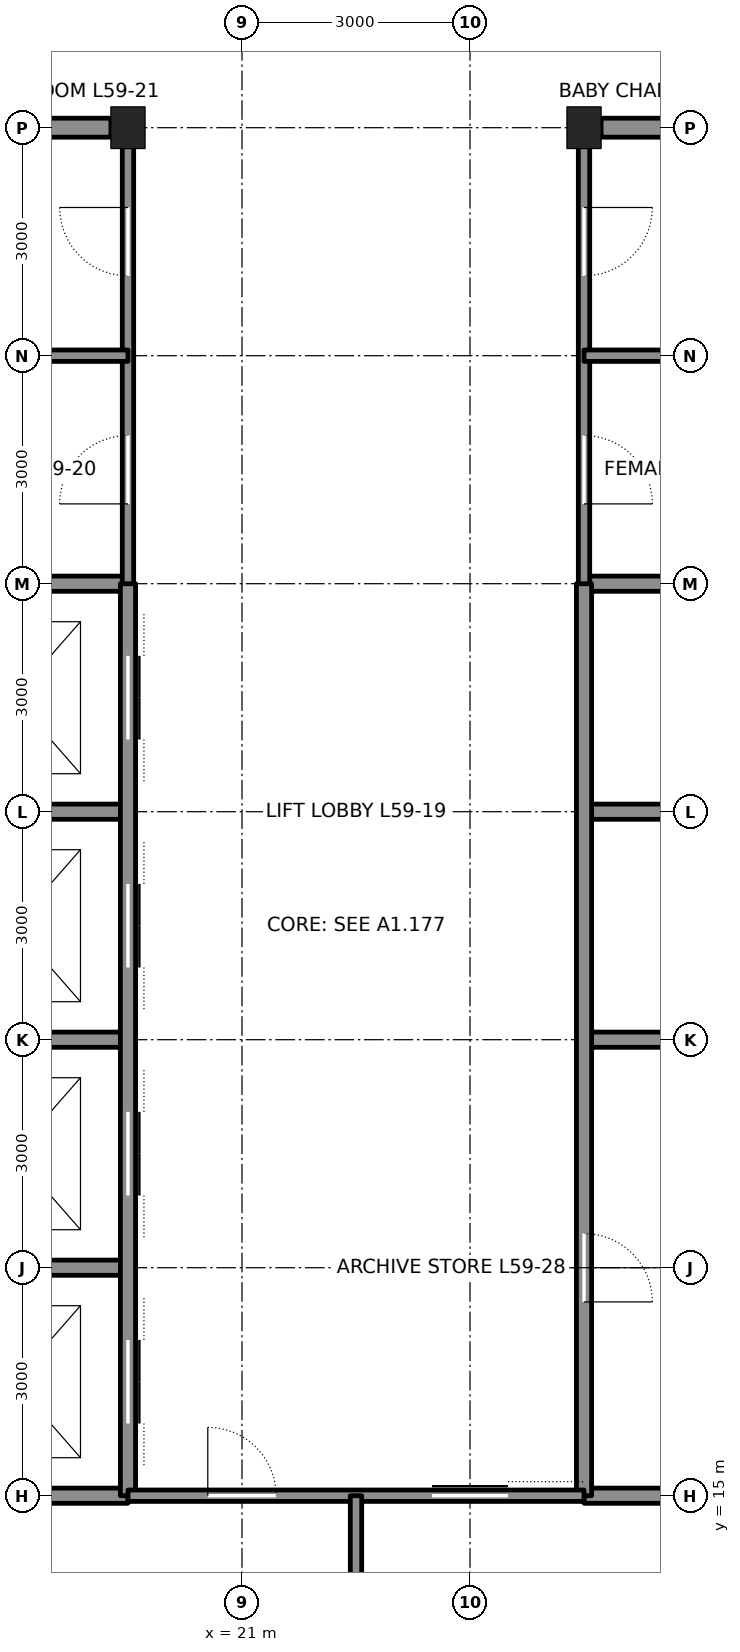
"""IFC4 building model, lengths in metres.
Left out: names, types, materials, properties, quantities, classifications, styles, units other than length and angle.
Written with IfcOpenShell. Run it as: python <this file> out.ifc"""

import sys

from ifc_helpers import new_model, si_unit, direction, frame, frame_2d, origin, origin_2d, place, context, subcontext, project, spatial, rectangle, i_section, extrude, element, fill, save


model = new_model("IFC4")
c1 = context("Model", 3, precision=1e-05, world=origin(), true_north=direction((0.0, 1.0)))
c2 = subcontext(c1, "Body", "Model", "MODEL_VIEW")
j1 = project(units=[si_unit("LENGTHUNIT", "METRE"), si_unit("PLANEANGLEUNIT", "RADIAN")], contexts=[c1])
p1 = place(None, origin())
s1 = spatial("IfcSite", under=j1, at=p1, CompositionType="ELEMENT")
p2 = place(p1, origin())
s2 = spatial("IfcBuilding", under=s1, at=p2, CompositionType="ELEMENT")
p3 = place(p2, frame((0.0, 0.0, 266.4)))
s3 = spatial("IfcBuildingStorey", under=s2, at=p3, CompositionType="ELEMENT", Elevation=266.4)
for number, where, z_axis, x_axis in (
    (1, (19.5, 33.0, 0.0), (0.0, 0.0, 1.0), (1.0, 0.0, 0.0)),
    (2, (25.5, 33.0, 0.0), (0.0, 0.0, 1.0), (1.0, 0.0, 0.0)),
):
    element("IfcColumn", number, at=place(p3, frame(where, z_axis=z_axis, x_axis=x_axis)), inside=s3, PredefinedType="COLUMN", context=c2, shape_type="SweptSolid", body=[
        extrude(i_section(OverallWidth=0.449, OverallDepth=0.549, WebThickness=0.072, FlangeThickness=0.115, at=origin_2d()), origin(), (0.0, 0.0, 1.0), 4.2),
    ])
for number, where, z_axis, x_axis in (
    (3, (12.0, 15.0, 0.0), (0.0, 0.0, 1.0), (1.0, 0.0, 0.0)),
    (4, (25.5, 15.0, 0.0), (0.0, 0.0, 1.0), (1.0, 0.0, 0.0)),
):
    element("IfcWall", number, at=place(p3, frame(where, z_axis=z_axis, x_axis=x_axis)), inside=s3, PredefinedType="SOLIDWALL", context=c2, shape_type="SweptSolid", body=[
        extrude(rectangle(XDim=7.5, YDim=0.2, at=frame_2d((3.75, 0.0))), origin(), (0.0, 0.0, 1.0), 4.04),
    ])
for number, where, z_axis, x_axis in (
    (5, (16.725, 24.0, 0.0), (0.0, 0.0, 1.0), (1.0, 0.0, 0.0)),
    (6, (25.5, 24.0, 0.0), (0.0, 0.0, 1.0), (1.0, 0.0, 0.0)),
):
    element("IfcWall", number, at=place(p3, frame(where, z_axis=z_axis, x_axis=x_axis)), inside=s3, PredefinedType="SOLIDWALL", context=c2, shape_type="SweptSolid", body=[
        extrude(rectangle(XDim=2.775, YDim=0.2, at=frame_2d((1.388, 0.0))), origin(), (0.0, 0.0, 1.0), 3.09),
    ])
p4 = place(p3, frame((12.0, 27.0, 0.0), z_axis=(0.0, 0.0, 1.0), x_axis=(1.0, 0.0, 0.0)))
e7 = element("IfcWall", 7, at=p4, inside=s3, PredefinedType="SOLIDWALL", context=c2, shape_type="SweptSolid", body=[
    extrude(rectangle(XDim=7.5, YDim=0.2, at=frame_2d((3.75, 0.0))), origin(), (0.0, 0.0, 1.0), 4.04),
])
p5 = place(p4, frame((1.65, 0.0, 0.0)))
e8 = element("IfcOpeningElement", 8, at=p5, cuts=e7, PredefinedType="OPENING", context=c2, shape_type="SweptSolid", body=[
    extrude(rectangle(XDim=1.2, YDim=2.1, at=frame_2d((0.6, 1.05))), frame((0.0, 0.11, 0.0), z_axis=(0.0, -1.0, 0.0), x_axis=(1.0, 0.0, 0.0)), (0.0, 0.0, 1.0), 0.22),
])
p6 = place(p3, frame((25.5, 27.0, 0.0), z_axis=(0.0, 0.0, 1.0), x_axis=(1.0, 0.0, 0.0)))
e9 = element("IfcWall", 9, at=p6, inside=s3, PredefinedType="SOLIDWALL", context=c2, shape_type="SweptSolid", body=[
    extrude(rectangle(XDim=3.0, YDim=0.2, at=frame_2d((1.5, 0.0))), origin(), (0.0, 0.0, 1.0), 4.04),
])
for number, where, z_axis, x_axis in (
    (10, (16.725, 33.0, 0.0), (0.0, 0.0, 1.0), (1.0, 0.0, 0.0)),
    (11, (25.725, 33.0, 0.0), (0.0, 0.0, 1.0), (1.0, 0.0, 0.0)),
):
    element("IfcWall", number, at=place(p3, frame(where, z_axis=z_axis, x_axis=x_axis)), inside=s3, PredefinedType="SOLIDWALL", context=c2, shape_type="SweptSolid", body=[
        extrude(rectangle(XDim=2.55, YDim=0.25, at=frame_2d((1.275, 0.0))), origin(), (0.0, 0.0, 1.0), 3.182),
    ])
p7 = place(p3, frame((16.5, 18.0, 0.0), z_axis=(0.0, 0.0, 1.0), x_axis=(1.0, 0.0, 0.0)))
e12 = element("IfcWall", 12, at=p7, inside=s3, PredefinedType="SOLIDWALL", context=c2, shape_type="SweptSolid", body=[
    extrude(rectangle(XDim=3.0, YDim=0.2, at=frame_2d((1.5, 0.0))), origin(), (0.0, 0.0, 1.0), 4.04),
])
for number, where, z_axis, x_axis in (
    (13, (16.725, 21.0, 0.0), (0.0, 0.0, 1.0), (1.0, 0.0, 0.0)),
    (14, (25.5, 21.0, 0.0), (0.0, 0.0, 1.0), (1.0, 0.0, 0.0)),
):
    element("IfcWall", number, at=place(p3, frame(where, z_axis=z_axis, x_axis=x_axis)), inside=s3, PredefinedType="SOLIDWALL", context=c2, shape_type="SweptSolid", body=[
        extrude(rectangle(XDim=2.775, YDim=0.2, at=frame_2d((1.388, 0.0))), origin(), (0.0, 0.0, 1.0), 3.09),
    ])
p8 = place(p3, frame((19.5, 15.0, 0.0), z_axis=(0.0, 0.0, 1.0), x_axis=(0.0, 1.0, 0.0)))
e15 = element("IfcWall", 15, at=p8, inside=s3, PredefinedType="SOLIDWALL", context=c2, shape_type="SweptSolid", body=[
    extrude(rectangle(XDim=12.0, YDim=0.2, at=frame_2d((6.0, 0.0))), origin(), (0.0, 0.0, 1.0), 3.065),
])
p9 = place(p8, frame((0.95, 0.0, 0.0)))
e16 = element("IfcOpeningElement", 16, at=p9, cuts=e15, PredefinedType="OPENING", context=c2, shape_type="SweptSolid", body=[
    extrude(rectangle(XDim=1.1, YDim=2.1, at=frame_2d((0.55, 1.05))), frame((0.0, 0.11, 0.0), z_axis=(0.0, -1.0, 0.0), x_axis=(1.0, 0.0, 0.0)), (0.0, 0.0, 1.0), 0.22),
])
p10 = place(p8, frame((3.95, 0.0, 0.0)))
e17 = element("IfcOpeningElement", 17, at=p10, cuts=e15, PredefinedType="OPENING", context=c2, shape_type="SweptSolid", body=[
    extrude(rectangle(XDim=1.1, YDim=2.1, at=frame_2d((0.55, 1.05))), frame((0.0, 0.11, 0.0), z_axis=(0.0, -1.0, 0.0), x_axis=(1.0, 0.0, 0.0)), (0.0, 0.0, 1.0), 0.22),
])
p11 = place(p8, frame((6.95, 0.0, 0.0)))
e18 = element("IfcOpeningElement", 18, at=p11, cuts=e15, PredefinedType="OPENING", context=c2, shape_type="SweptSolid", body=[
    extrude(rectangle(XDim=1.1, YDim=2.1, at=frame_2d((0.55, 1.05))), frame((0.0, 0.11, 0.0), z_axis=(0.0, -1.0, 0.0), x_axis=(1.0, 0.0, 0.0)), (0.0, 0.0, 1.0), 0.22),
])
p12 = place(p8, frame((9.95, 0.0, 0.0)))
e19 = element("IfcOpeningElement", 19, at=p12, cuts=e15, PredefinedType="OPENING", context=c2, shape_type="SweptSolid", body=[
    extrude(rectangle(XDim=1.1, YDim=2.1, at=frame_2d((0.55, 1.05))), frame((0.0, 0.11, 0.0), z_axis=(0.0, -1.0, 0.0), x_axis=(1.0, 0.0, 0.0)), (0.0, 0.0, 1.0), 0.22),
])
p13 = place(p3, frame((19.5, 27.0, 0.0), z_axis=(0.0, 0.0, 1.0), x_axis=(0.0, 1.0, 0.0)))
e20 = element("IfcWall", 20, at=p13, inside=s3, PredefinedType="PARTITIONING", context=c2, shape_type="SweptSolid", body=[
    extrude(rectangle(XDim=5.75, YDim=0.15, at=frame_2d((2.875, 0.0))), origin(), (0.0, 0.0, 1.0), 3.065),
])
p14 = place(p13, frame((1.05, 0.0, 0.0)))
e21 = element("IfcOpeningElement", 21, at=p14, cuts=e20, PredefinedType="OPENING", context=c2, shape_type="SweptSolid", body=[
    extrude(rectangle(XDim=0.9, YDim=2.1, at=frame_2d((0.45, 1.05))), frame((0.0, 0.085, 0.0), z_axis=(0.0, -1.0, 0.0), x_axis=(1.0, 0.0, 0.0)), (0.0, 0.0, 1.0), 0.17),
])
p15 = place(p13, frame((4.05, 0.0, 0.0)))
e22 = element("IfcOpeningElement", 22, at=p15, cuts=e20, PredefinedType="OPENING", context=c2, shape_type="SweptSolid", body=[
    extrude(rectangle(XDim=0.9, YDim=2.1, at=frame_2d((0.45, 1.05))), frame((0.0, 0.085, 0.0), z_axis=(0.0, -1.0, 0.0), x_axis=(1.0, 0.0, 0.0)), (0.0, 0.0, 1.0), 0.17),
])
p16 = place(p3, frame((25.5, 15.0, 0.0), z_axis=(0.0, 0.0, 1.0), x_axis=(0.0, 1.0, 0.0)))
e23 = element("IfcWall", 23, at=p16, inside=s3, PredefinedType="SOLIDWALL", context=c2, shape_type="SweptSolid", body=[
    extrude(rectangle(XDim=12.0, YDim=0.2, at=frame_2d((6.0, 0.0))), origin(), (0.0, 0.0, 1.0), 3.065),
])
p17 = place(p16, frame((2.55, 0.0, 0.0)))
e24 = element("IfcOpeningElement", 24, at=p17, cuts=e23, PredefinedType="OPENING", context=c2, shape_type="SweptSolid", body=[
    extrude(rectangle(XDim=0.9, YDim=2.1, at=frame_2d((0.45, 1.05))), frame((0.0, 0.11, 0.0), z_axis=(0.0, -1.0, 0.0), x_axis=(1.0, 0.0, 0.0)), (0.0, 0.0, 1.0), 0.22),
])
p18 = place(p3, frame((25.5, 27.0, 0.0), z_axis=(0.0, 0.0, 1.0), x_axis=(0.0, 1.0, 0.0)))
e25 = element("IfcWall", 25, at=p18, inside=s3, PredefinedType="PARTITIONING", context=c2, shape_type="SweptSolid", body=[
    extrude(rectangle(XDim=5.75, YDim=0.15, at=frame_2d((2.875, 0.0))), origin(), (0.0, 0.0, 1.0), 3.065),
])
p19 = place(p18, frame((1.05, 0.0, 0.0)))
e26 = element("IfcOpeningElement", 26, at=p19, cuts=e25, PredefinedType="OPENING", context=c2, shape_type="SweptSolid", body=[
    extrude(rectangle(XDim=0.9, YDim=2.1, at=frame_2d((0.45, 1.05))), frame((0.0, 0.085, 0.0), z_axis=(0.0, -1.0, 0.0), x_axis=(1.0, 0.0, 0.0)), (0.0, 0.0, 1.0), 0.17),
])
p20 = place(p18, frame((4.05, 0.0, 0.0)))
e27 = element("IfcOpeningElement", 27, at=p20, cuts=e25, PredefinedType="OPENING", context=c2, shape_type="SweptSolid", body=[
    extrude(rectangle(XDim=0.9, YDim=2.1, at=frame_2d((0.45, 1.05))), frame((0.0, 0.085, 0.0), z_axis=(0.0, -1.0, 0.0), x_axis=(1.0, 0.0, 0.0)), (0.0, 0.0, 1.0), 0.17),
])
p21 = place(p3, frame((19.5, 15.0, 0.0), z_axis=(0.0, 0.0, 1.0), x_axis=(1.0, 0.0, 0.0)))
e28 = element("IfcWall", 28, at=p21, inside=s3, PredefinedType="PARTITIONING", context=c2, shape_type="SweptSolid", body=[
    extrude(rectangle(XDim=6.0, YDim=0.15, at=frame_2d((3.0, 0.0))), origin(), (0.0, 0.0, 1.0), 4.04),
])
p22 = place(p21, frame((4.0, 0.0, 0.0)))
e29 = element("IfcOpeningElement", 29, at=p22, cuts=e28, PredefinedType="OPENING", context=c2, shape_type="SweptSolid", body=[
    extrude(rectangle(XDim=1.0, YDim=2.1, at=frame_2d((0.5, 1.05))), frame((0.0, 0.085, 0.0), z_axis=(0.0, -1.0, 0.0), x_axis=(1.0, 0.0, 0.0)), (0.0, 0.0, 1.0), 0.17),
])
p23 = place(p21, frame((1.05, 0.0, 0.0)))
e30 = element("IfcOpeningElement", 30, at=p23, cuts=e28, PredefinedType="OPENING", context=c2, shape_type="SweptSolid", body=[
    extrude(rectangle(XDim=0.9, YDim=2.1, at=frame_2d((0.45, 1.05))), frame((0.0, 0.085, 0.0), z_axis=(0.0, -1.0, 0.0), x_axis=(1.0, 0.0, 0.0)), (0.0, 0.0, 1.0), 0.17),
])
for number, where, z_axis, x_axis in (
    (31, (22.5, 15.0, 0.0), (0.0, 0.0, 1.0), (0.0, -1.0, 0.0)),
    (32, (16.5, 30.0, 0.0), (0.0, 0.0, 1.0), (1.0, 0.0, 0.0)),
    (33, (25.5, 30.0, 0.0), (0.0, 0.0, 1.0), (1.0, 0.0, 0.0)),
):
    element("IfcWall", number, at=place(p3, frame(where, z_axis=z_axis, x_axis=x_axis)), inside=s3, PredefinedType="PARTITIONING", context=c2, shape_type="SweptSolid", body=[
        extrude(rectangle(XDim=3.0, YDim=0.15, at=frame_2d((1.5, 0.0))), origin(), (0.0, 0.0, 1.0), 4.04),
    ])
p24 = place(p14, origin())
e34 = element("IfcDoor", 34, at=p24, inside=s3, OperationType="SINGLE_SWING_LEFT", PredefinedType="DOOR", context=c2, shape_type="SweptSolid", body=[
    extrude(rectangle(XDim=0.9, YDim=2.1, at=frame_2d((0.45, 1.05))), frame((0.0, 0.025, 0.0), z_axis=(0.0, -1.0, 0.0), x_axis=(1.0, 0.0, 0.0)), (0.0, 0.0, 1.0), 0.05),
])
fill(e21, e34)
p25 = place(p15, origin())
e35 = element("IfcDoor", 35, at=p25, inside=s3, OperationType="SINGLE_SWING_RIGHT", PredefinedType="DOOR", context=c2, shape_type="SweptSolid", body=[
    extrude(rectangle(XDim=0.9, YDim=2.1, at=frame_2d((0.45, 1.05))), frame((0.0, 0.025, 0.0), z_axis=(0.0, -1.0, 0.0), x_axis=(1.0, 0.0, 0.0)), (0.0, 0.0, 1.0), 0.05),
])
fill(e22, e35)
p26 = place(p19, frame((0.9, 0.0, 0.0), z_axis=(0.0, 0.0, 1.0), x_axis=(-1.0, 0.0, 0.0)))
e36 = element("IfcDoor", 36, at=p26, inside=s3, OperationType="SINGLE_SWING_RIGHT", PredefinedType="DOOR", context=c2, shape_type="SweptSolid", body=[
    extrude(rectangle(XDim=0.9, YDim=2.1, at=frame_2d((0.45, 1.05))), frame((0.0, 0.025, 0.0), z_axis=(0.0, -1.0, 0.0), x_axis=(1.0, 0.0, 0.0)), (0.0, 0.0, 1.0), 0.05),
])
fill(e26, e36)
p27 = place(p20, frame((0.9, 0.0, 0.0), z_axis=(0.0, 0.0, 1.0), x_axis=(-1.0, 0.0, 0.0)))
e37 = element("IfcDoor", 37, at=p27, inside=s3, OperationType="SINGLE_SWING_LEFT", PredefinedType="DOOR", context=c2, shape_type="SweptSolid", body=[
    extrude(rectangle(XDim=0.9, YDim=2.1, at=frame_2d((0.45, 1.05))), frame((0.0, 0.025, 0.0), z_axis=(0.0, -1.0, 0.0), x_axis=(1.0, 0.0, 0.0)), (0.0, 0.0, 1.0), 0.05),
])
fill(e27, e37)
p28 = place(p22, origin())
e38 = element("IfcDoor", 38, at=p28, inside=s3, OperationType="SLIDING_TO_LEFT", PredefinedType="DOOR", context=c2, shape_type="SweptSolid", body=[
    extrude(rectangle(XDim=1.0, YDim=2.1, at=frame_2d((0.5, 1.05))), frame((0.0, 0.025, 0.0), z_axis=(0.0, -1.0, 0.0), x_axis=(1.0, 0.0, 0.0)), (0.0, 0.0, 1.0), 0.05),
])
fill(e29, e38)
p29 = place(p17, frame((0.9, 0.0, 0.0), z_axis=(0.0, 0.0, 1.0), x_axis=(-1.0, 0.0, 0.0)))
e39 = element("IfcDoor", 39, at=p29, inside=s3, OperationType="SINGLE_SWING_RIGHT", PredefinedType="DOOR", context=c2, shape_type="SweptSolid", body=[
    extrude(rectangle(XDim=0.9, YDim=2.1, at=frame_2d((0.45, 1.05))), frame((0.0, 0.025, 0.0), z_axis=(0.0, -1.0, 0.0), x_axis=(1.0, 0.0, 0.0)), (0.0, 0.0, 1.0), 0.05),
])
fill(e24, e39)
p30 = place(p23, origin())
e40 = element("IfcDoor", 40, at=p30, inside=s3, OperationType="SINGLE_SWING_LEFT", PredefinedType="DOOR", context=c2, shape_type="SweptSolid", body=[
    extrude(rectangle(XDim=0.9, YDim=2.1, at=frame_2d((0.45, 1.05))), frame((0.0, 0.025, 0.0), z_axis=(0.0, -1.0, 0.0), x_axis=(1.0, 0.0, 0.0)), (0.0, 0.0, 1.0), 0.05),
])
fill(e30, e40)
p31 = place(p9, origin())
e41 = element("IfcDoor", 41, at=p31, inside=s3, OperationType="DOUBLE_DOOR_SLIDING", PredefinedType="DOOR", context=c2, shape_type="SweptSolid", body=[
    extrude(rectangle(XDim=1.1, YDim=2.1, at=frame_2d((0.55, 1.05))), frame((0.0, 0.025, 0.0), z_axis=(0.0, -1.0, 0.0), x_axis=(1.0, 0.0, 0.0)), (0.0, 0.0, 1.0), 0.05),
])
fill(e16, e41)
p32 = place(p10, origin())
e42 = element("IfcDoor", 42, at=p32, inside=s3, OperationType="DOUBLE_DOOR_SLIDING", PredefinedType="DOOR", context=c2, shape_type="SweptSolid", body=[
    extrude(rectangle(XDim=1.1, YDim=2.1, at=frame_2d((0.55, 1.05))), frame((0.0, 0.025, 0.0), z_axis=(0.0, -1.0, 0.0), x_axis=(1.0, 0.0, 0.0)), (0.0, 0.0, 1.0), 0.05),
])
fill(e17, e42)
p33 = place(p11, origin())
e43 = element("IfcDoor", 43, at=p33, inside=s3, OperationType="DOUBLE_DOOR_SLIDING", PredefinedType="DOOR", context=c2, shape_type="SweptSolid", body=[
    extrude(rectangle(XDim=1.1, YDim=2.1, at=frame_2d((0.55, 1.05))), frame((0.0, 0.025, 0.0), z_axis=(0.0, -1.0, 0.0), x_axis=(1.0, 0.0, 0.0)), (0.0, 0.0, 1.0), 0.05),
])
fill(e18, e43)
p34 = place(p12, origin())
e44 = element("IfcDoor", 44, at=p34, inside=s3, OperationType="DOUBLE_DOOR_SLIDING", PredefinedType="DOOR", context=c2, shape_type="SweptSolid", body=[
    extrude(rectangle(XDim=1.1, YDim=2.1, at=frame_2d((0.55, 1.05))), frame((0.0, 0.025, 0.0), z_axis=(0.0, -1.0, 0.0), x_axis=(1.0, 0.0, 0.0)), (0.0, 0.0, 1.0), 0.05),
])
fill(e19, e44)
save(model, sys.argv[1])
